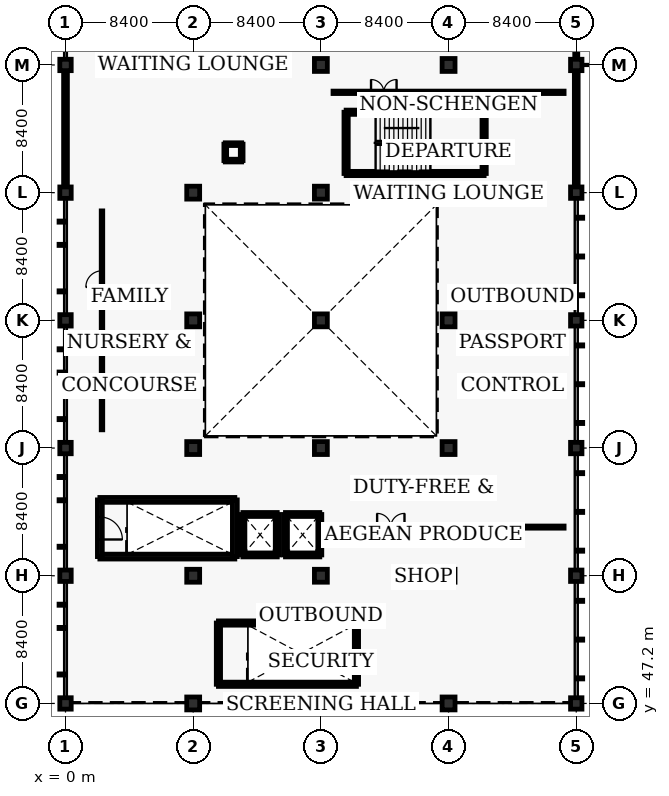
"""IFC4 building model, lengths in metres.
Left out: names, types, materials, properties, quantities, classifications, styles, units other than length and angle.
Written with IfcOpenShell. Run it as: python <this file> out.ifc"""

import sys

from ifc_helpers import new_model, si_unit, direction, frame, frame_2d, origin, origin_2d, place, context, subcontext, project, spatial, rectangle, circle, extrude, element, fill, save


model = new_model("IFC4")
c1 = context("Model", 3, precision=1e-05, world=origin(), true_north=direction((0.0, 1.0)))
c2 = subcontext(c1, "Body", "Model", "MODEL_VIEW")
j1 = project(units=[si_unit("LENGTHUNIT", "METRE"), si_unit("PLANEANGLEUNIT", "RADIAN")], contexts=[c1])
p1 = place(None, origin())
s1 = spatial("IfcSite", under=j1, at=p1, CompositionType="ELEMENT")
p2 = place(p1, origin())
s2 = spatial("IfcBuilding", under=s1, at=p2, CompositionType="ELEMENT")
p3 = place(p2, frame((0.0, 0.0, 5.44)))
s3 = spatial("IfcBuildingStorey", under=s2, at=p3, CompositionType="ELEMENT", Elevation=5.44)
for number, where, z_axis, x_axis in (
    (1, (0.0, 47.2, 0.0), (0.0, 0.0, 1.0), (1.0, 0.0, 0.0)),
    (2, (0.0, 55.6, 0.0), (0.0, 0.0, 1.0), (1.0, 0.0, 0.0)),
    (3, (0.0, 64.0, 0.0), (0.0, 0.0, 1.0), (1.0, 0.0, 0.0)),
    (4, (0.0, 72.4, 0.0), (0.0, 0.0, 1.0), (1.0, 0.0, 0.0)),
    (5, (0.0, 80.8, 0.0), (0.0, 0.0, 1.0), (1.0, 0.0, 0.0)),
    (6, (0.0, 89.2, 0.0), (0.0, 0.0, 1.0), (1.0, 0.0, 0.0)),
):
    element("IfcColumn", number, at=place(p3, frame(where, z_axis=z_axis, x_axis=x_axis)), inside=s3, PredefinedType="COLUMN", context=c2, shape_type="SweptSolid", body=[
        extrude(rectangle(XDim=0.75, YDim=0.75, at=origin_2d()), origin(), (0.0, 0.0, 1.0), 4.16),
    ])
p4 = place(p3, frame((8.4, 47.2, 0.0), z_axis=(0.0, 0.0, 1.0), x_axis=(1.0, 0.0, 0.0)))
e7 = element("IfcColumn", 7, at=p4, inside=s3, PredefinedType="COLUMN", context=c2, shape_type="SweptSolid", body=[
    extrude(circle(Radius=0.425, at=origin_2d()), origin(), (0.0, 0.0, 1.0), 7.582),
])
p5 = place(p3, frame((8.4, 55.6, 0.0), z_axis=(0.0, 0.0, 1.0), x_axis=(1.0, 0.0, 0.0)))
e8 = element("IfcColumn", 8, at=p5, inside=s3, PredefinedType="COLUMN", context=c2, shape_type="SweptSolid", body=[
    extrude(circle(Radius=0.425, at=origin_2d()), origin(), (0.0, 0.0, 1.0), 8.296),
])
p6 = place(p3, frame((8.4, 64.0, 0.0), z_axis=(0.0, 0.0, 1.0), x_axis=(1.0, 0.0, 0.0)))
e9 = element("IfcColumn", 9, at=p6, inside=s3, PredefinedType="COLUMN", context=c2, shape_type="SweptSolid", body=[
    extrude(circle(Radius=0.425, at=origin_2d()), origin(), (0.0, 0.0, 1.0), 9.01),
])
for number, where, z_axis, x_axis in (
    (10, (8.4, 72.4, 0.0), (0.0, 0.0, 1.0), (1.0, 0.0, 0.0)),
    (11, (8.4, 80.8, 0.0), (0.0, 0.0, 1.0), (1.0, 0.0, 0.0)),
    (12, (8.4, 89.2, 0.0), (0.0, 0.0, 1.0), (1.0, 0.0, 0.0)),
):
    element("IfcColumn", number, at=place(p3, frame(where, z_axis=z_axis, x_axis=x_axis)), inside=s3, PredefinedType="COLUMN", context=c2, shape_type="SweptSolid", body=[
        extrude(circle(Radius=0.425, at=origin_2d()), origin(), (0.0, 0.0, 1.0), 4.16),
    ])
p7 = place(p3, frame((16.8, 47.2, 0.0), z_axis=(0.0, 0.0, 1.0), x_axis=(1.0, 0.0, 0.0)))
e13 = element("IfcColumn", 13, at=p7, inside=s3, PredefinedType="COLUMN", context=c2, shape_type="SweptSolid", body=[
    extrude(circle(Radius=0.425, at=origin_2d()), origin(), (0.0, 0.0, 1.0), 10.06),
])
p8 = place(p3, frame((16.8, 55.6, 0.0), z_axis=(0.0, 0.0, 1.0), x_axis=(1.0, 0.0, 0.0)))
e14 = element("IfcColumn", 14, at=p8, inside=s3, PredefinedType="COLUMN", context=c2, shape_type="SweptSolid", body=[
    extrude(circle(Radius=0.425, at=origin_2d()), origin(), (0.0, 0.0, 1.0), 10.774),
])
p9 = place(p3, frame((16.8, 64.0, 0.0), z_axis=(0.0, 0.0, 1.0), x_axis=(1.0, 0.0, 0.0)))
e15 = element("IfcColumn", 15, at=p9, inside=s3, PredefinedType="COLUMN", context=c2, shape_type="SweptSolid", body=[
    extrude(circle(Radius=0.425, at=origin_2d()), origin(), (0.0, 0.0, 1.0), 11.489),
])
for number, where, z_axis, x_axis in (
    (16, (16.8, 72.4, 0.0), (0.0, 0.0, 1.0), (1.0, 0.0, 0.0)),
    (17, (16.8, 80.8, 0.0), (0.0, 0.0, 1.0), (1.0, 0.0, 0.0)),
    (18, (16.8, 89.2, 0.0), (0.0, 0.0, 1.0), (1.0, 0.0, 0.0)),
):
    element("IfcColumn", number, at=place(p3, frame(where, z_axis=z_axis, x_axis=x_axis)), inside=s3, PredefinedType="COLUMN", context=c2, shape_type="SweptSolid", body=[
        extrude(circle(Radius=0.425, at=origin_2d()), origin(), (0.0, 0.0, 1.0), 4.16),
    ])
p10 = place(p3, frame((25.2, 47.2, 0.0), z_axis=(0.0, 0.0, 1.0), x_axis=(1.0, 0.0, 0.0)))
e19 = element("IfcColumn", 19, at=p10, inside=s3, PredefinedType="COLUMN", context=c2, shape_type="SweptSolid", body=[
    extrude(circle(Radius=0.425, at=origin_2d()), origin(), (0.0, 0.0, 1.0), 7.582),
])
p11 = place(p3, frame((25.2, 55.6, 0.0), z_axis=(0.0, 0.0, 1.0), x_axis=(1.0, 0.0, 0.0)))
e20 = element("IfcColumn", 20, at=p11, inside=s3, PredefinedType="COLUMN", context=c2, shape_type="SweptSolid", body=[
    extrude(circle(Radius=0.425, at=origin_2d()), origin(), (0.0, 0.0, 1.0), 8.296),
])
p12 = place(p3, frame((25.2, 64.0, 0.0), z_axis=(0.0, 0.0, 1.0), x_axis=(1.0, 0.0, 0.0)))
e21 = element("IfcColumn", 21, at=p12, inside=s3, PredefinedType="COLUMN", context=c2, shape_type="SweptSolid", body=[
    extrude(circle(Radius=0.425, at=origin_2d()), origin(), (0.0, 0.0, 1.0), 9.01),
])
for number, where, z_axis, x_axis in (
    (22, (25.2, 72.4, 0.0), (0.0, 0.0, 1.0), (1.0, 0.0, 0.0)),
    (23, (25.2, 80.8, 0.0), (0.0, 0.0, 1.0), (1.0, 0.0, 0.0)),
    (24, (25.2, 89.2, 0.0), (0.0, 0.0, 1.0), (1.0, 0.0, 0.0)),
):
    element("IfcColumn", number, at=place(p3, frame(where, z_axis=z_axis, x_axis=x_axis)), inside=s3, PredefinedType="COLUMN", context=c2, shape_type="SweptSolid", body=[
        extrude(circle(Radius=0.425, at=origin_2d()), origin(), (0.0, 0.0, 1.0), 4.16),
    ])
for number, where, z_axis, x_axis in (
    (25, (33.6, 47.2, 0.0), (0.0, 0.0, 1.0), (1.0, 0.0, 0.0)),
    (26, (33.6, 55.6, 0.0), (0.0, 0.0, 1.0), (1.0, 0.0, 0.0)),
    (27, (33.6, 64.0, 0.0), (0.0, 0.0, 1.0), (1.0, 0.0, 0.0)),
    (28, (33.6, 72.4, 0.0), (0.0, 0.0, 1.0), (1.0, 0.0, 0.0)),
    (29, (33.6, 80.8, 0.0), (0.0, 0.0, 1.0), (1.0, 0.0, 0.0)),
    (30, (33.6, 89.2, 0.0), (0.0, 0.0, 1.0), (1.0, 0.0, 0.0)),
):
    element("IfcColumn", number, at=place(p3, frame(where, z_axis=z_axis, x_axis=x_axis)), inside=s3, PredefinedType="COLUMN", context=c2, shape_type="SweptSolid", body=[
        extrude(rectangle(XDim=0.75, YDim=0.75, at=origin_2d()), origin(), (0.0, 0.0, 1.0), 4.16),
    ])
for number, where, z_axis, x_axis in (
    (31, (0.0, 88.825, 0.0), (0.0, 0.0, 1.0), (0.0, -1.0, 0.0)),
    (32, (33.6, 81.175, 0.0), (0.0, 0.0, 1.0), (0.0, 1.0, 0.0)),
):
    element("IfcWall", number, at=place(p3, frame(where, z_axis=z_axis, x_axis=x_axis)), inside=s3, PredefinedType="SOLIDWALL", context=c2, shape_type="SweptSolid", body=[
        extrude(rectangle(XDim=7.65, YDim=0.25, at=frame_2d((3.825, 0.0))), origin(), (0.0, 0.0, 1.0), 3.515),
    ])
for number, where, z_axis, x_axis in (
    (33, (2.26, 56.86, 0.0), (0.0, 0.0, 1.0), (1.0, 0.0, 0.0)),
    (34, (2.26, 60.59, 0.0), (0.0, 0.0, 1.0), (1.0, 0.0, 0.0)),
):
    element("IfcWall", number, at=place(p3, frame(where, z_axis=z_axis, x_axis=x_axis)), inside=s3, PredefinedType="SHEAR", context=c2, shape_type="SweptSolid", body=[
        extrude(rectangle(XDim=8.88, YDim=0.32, at=frame_2d((4.44, 0.0))), origin(), (0.0, 0.0, 1.0), 4.16),
    ])
p13 = place(p3, frame((2.26, 60.59, 0.0), z_axis=(0.0, 0.0, 1.0), x_axis=(0.0, -1.0, 0.0)))
e35 = element("IfcWall", 35, at=p13, inside=s3, PredefinedType="SHEAR", context=c2, shape_type="SweptSolid", body=[
    extrude(rectangle(XDim=3.73, YDim=0.32, at=frame_2d((1.865, 0.0))), origin(), (0.0, 0.0, 1.0), 4.16),
])
p14 = place(p13, frame((1.125, 0.0, 0.0)))
e36 = element("IfcOpeningElement", 36, at=p14, cuts=e35, PredefinedType="OPENING", context=c2, shape_type="SweptSolid", body=[
    extrude(rectangle(XDim=1.48, YDim=2.15, at=frame_2d((0.74, 1.075))), frame((0.0, 0.17, 0.0), z_axis=(0.0, -1.0, 0.0), x_axis=(1.0, 0.0, 0.0)), (0.0, 0.0, 1.0), 0.34),
])
p15 = place(p3, frame((11.14, 56.86, 0.0), z_axis=(0.0, 0.0, 1.0), x_axis=(0.0, 1.0, 0.0)))
e37 = element("IfcWall", 37, at=p15, inside=s3, PredefinedType="SHEAR", context=c2, shape_type="SweptSolid", body=[
    extrude(rectangle(XDim=3.73, YDim=0.32, at=frame_2d((1.865, 0.0))), origin(), (0.0, 0.0, 1.0), 4.16),
])
p16 = place(p3, frame((11.67, 56.97, 0.0), z_axis=(0.0, 0.0, 1.0), x_axis=(1.0, 0.0, 0.0)))
e38 = element("IfcWall", 38, at=p16, inside=s3, PredefinedType="SHEAR", context=c2, shape_type="SweptSolid", body=[
    extrude(rectangle(XDim=2.26, YDim=0.26, at=frame_2d((1.13, 0.0))), origin(), (0.0, 0.0, 1.0), 4.16),
])
for number, where, z_axis, x_axis in (
    (39, (13.93, 56.97, 0.0), (0.0, 0.0, 1.0), (0.0, 1.0, 0.0)),
    (40, (11.67, 59.63, 0.0), (0.0, 0.0, 1.0), (0.0, -1.0, 0.0)),
):
    element("IfcWall", number, at=place(p3, frame(where, z_axis=z_axis, x_axis=x_axis)), inside=s3, PredefinedType="SHEAR", context=c2, shape_type="SweptSolid", body=[
        extrude(rectangle(XDim=2.66, YDim=0.26, at=frame_2d((1.33, 0.0))), origin(), (0.0, 0.0, 1.0), 4.16),
    ])
p17 = place(p3, frame((11.67, 59.63, 0.0), z_axis=(0.0, 0.0, 1.0), x_axis=(1.0, 0.0, 0.0)))
e41 = element("IfcWall", 41, at=p17, inside=s3, PredefinedType="SHEAR", context=c2, shape_type="SweptSolid", body=[
    extrude(rectangle(XDim=2.26, YDim=0.26, at=frame_2d((1.13, 0.0))), origin(), (0.0, 0.0, 1.0), 4.16),
])
p18 = place(p17, frame((0.51, 0.0, 0.0)))
e42 = element("IfcOpeningElement", 42, at=p18, cuts=e41, PredefinedType="OPENING", context=c2, shape_type="SweptSolid", body=[
    extrude(rectangle(XDim=1.24, YDim=2.14, at=frame_2d((0.62, 1.07))), frame((0.0, 0.14, 0.0), z_axis=(0.0, -1.0, 0.0), x_axis=(1.0, 0.0, 0.0)), (0.0, 0.0, 1.0), 0.28),
])
p19 = place(p3, frame((14.47, 56.97, 0.0), z_axis=(0.0, 0.0, 1.0), x_axis=(1.0, 0.0, 0.0)))
e43 = element("IfcWall", 43, at=p19, inside=s3, PredefinedType="SHEAR", context=c2, shape_type="SweptSolid", body=[
    extrude(rectangle(XDim=2.26, YDim=0.26, at=frame_2d((1.13, 0.0))), origin(), (0.0, 0.0, 1.0), 4.16),
])
for number, where, z_axis, x_axis in (
    (44, (16.73, 56.97, 0.0), (0.0, 0.0, 1.0), (0.0, 1.0, 0.0)),
    (45, (14.47, 59.63, 0.0), (0.0, 0.0, 1.0), (0.0, -1.0, 0.0)),
):
    element("IfcWall", number, at=place(p3, frame(where, z_axis=z_axis, x_axis=x_axis)), inside=s3, PredefinedType="SHEAR", context=c2, shape_type="SweptSolid", body=[
        extrude(rectangle(XDim=2.66, YDim=0.26, at=frame_2d((1.33, 0.0))), origin(), (0.0, 0.0, 1.0), 4.16),
    ])
p20 = place(p3, frame((14.47, 59.63, 0.0), z_axis=(0.0, 0.0, 1.0), x_axis=(1.0, 0.0, 0.0)))
e46 = element("IfcWall", 46, at=p20, inside=s3, PredefinedType="SHEAR", context=c2, shape_type="SweptSolid", body=[
    extrude(rectangle(XDim=2.26, YDim=0.26, at=frame_2d((1.13, 0.0))), origin(), (0.0, 0.0, 1.0), 4.16),
])
p21 = place(p20, frame((0.51, 0.0, 0.0)))
e47 = element("IfcOpeningElement", 47, at=p21, cuts=e46, PredefinedType="OPENING", context=c2, shape_type="SweptSolid", body=[
    extrude(rectangle(XDim=1.24, YDim=2.14, at=frame_2d((0.62, 1.07))), frame((0.0, 0.14, 0.0), z_axis=(0.0, -1.0, 0.0), x_axis=(1.0, 0.0, 0.0)), (0.0, 0.0, 1.0), 0.28),
])
for number, where, z_axis, x_axis in (
    (48, (10.06, 48.46, 0.0), (0.0, 0.0, 1.0), (1.0, 0.0, 0.0)),
    (49, (10.06, 52.49, 0.0), (0.0, 0.0, 1.0), (1.0, 0.0, 0.0)),
):
    element("IfcWall", number, at=place(p3, frame(where, z_axis=z_axis, x_axis=x_axis)), inside=s3, PredefinedType="SHEAR", context=c2, shape_type="SweptSolid", body=[
        extrude(rectangle(XDim=9.08, YDim=0.28, at=frame_2d((4.54, 0.0))), origin(), (0.0, 0.0, 1.0), 4.16),
    ])
p22 = place(p3, frame((10.06, 52.49, 0.0), z_axis=(0.0, 0.0, 1.0), x_axis=(0.0, -1.0, 0.0)))
e50 = element("IfcWall", 50, at=p22, inside=s3, PredefinedType="SHEAR", context=c2, shape_type="SweptSolid", body=[
    extrude(rectangle(XDim=4.03, YDim=0.28, at=frame_2d((2.015, 0.0))), origin(), (0.0, 0.0, 1.0), 4.16),
])
p23 = place(p22, frame((1.035, 0.0, 0.0)))
e51 = element("IfcOpeningElement", 51, at=p23, cuts=e50, PredefinedType="OPENING", context=c2, shape_type="SweptSolid", body=[
    extrude(rectangle(XDim=1.96, YDim=2.22, at=frame_2d((0.98, 1.11))), frame((0.0, 0.15, 0.0), z_axis=(0.0, -1.0, 0.0), x_axis=(1.0, 0.0, 0.0)), (0.0, 0.0, 1.0), 0.3),
])
p24 = place(p3, frame((19.14, 48.46, 0.0), z_axis=(0.0, 0.0, 1.0), x_axis=(0.0, 1.0, 0.0)))
e52 = element("IfcWall", 52, at=p24, inside=s3, PredefinedType="SHEAR", context=c2, shape_type="SweptSolid", body=[
    extrude(rectangle(XDim=4.03, YDim=0.28, at=frame_2d((2.015, 0.0))), origin(), (0.0, 0.0, 1.0), 4.16),
])
for number, where, z_axis, x_axis in (
    (53, (18.46, 82.06, 0.0), (0.0, 0.0, 1.0), (1.0, 0.0, 0.0)),
    (54, (18.46, 86.09, 0.0), (0.0, 0.0, 1.0), (1.0, 0.0, 0.0)),
):
    element("IfcWall", number, at=place(p3, frame(where, z_axis=z_axis, x_axis=x_axis)), inside=s3, PredefinedType="SHEAR", context=c2, shape_type="SweptSolid", body=[
        extrude(rectangle(XDim=9.08, YDim=0.28, at=frame_2d((4.54, 0.0))), origin(), (0.0, 0.0, 1.0), 4.16),
    ])
p25 = place(p3, frame((18.46, 86.09, 0.0), z_axis=(0.0, 0.0, 1.0), x_axis=(0.0, -1.0, 0.0)))
e55 = element("IfcWall", 55, at=p25, inside=s3, PredefinedType="SHEAR", context=c2, shape_type="SweptSolid", body=[
    extrude(rectangle(XDim=4.03, YDim=0.28, at=frame_2d((2.015, 0.0))), origin(), (0.0, 0.0, 1.0), 4.16),
])
p26 = place(p25, frame((1.035, 0.0, 0.0)))
e56 = element("IfcOpeningElement", 56, at=p26, cuts=e55, PredefinedType="OPENING", context=c2, shape_type="SweptSolid", body=[
    extrude(rectangle(XDim=1.96, YDim=2.22, at=frame_2d((0.98, 1.11))), frame((0.0, 0.15, 0.0), z_axis=(0.0, -1.0, 0.0), x_axis=(1.0, 0.0, 0.0)), (0.0, 0.0, 1.0), 0.3),
])
p27 = place(p3, frame((27.54, 82.06, 0.0), z_axis=(0.0, 0.0, 1.0), x_axis=(0.0, 1.0, 0.0)))
e57 = element("IfcWall", 57, at=p27, inside=s3, PredefinedType="SHEAR", context=c2, shape_type="SweptSolid", body=[
    extrude(rectangle(XDim=4.03, YDim=0.28, at=frame_2d((2.015, 0.0))), origin(), (0.0, 0.0, 1.0), 4.16),
])
for number, where, z_axis, x_axis in (
    (58, (10.51, 82.91, 0.0), (0.0, 0.0, 1.0), (1.0, 0.0, 0.0)),
    (59, (11.59, 82.91, 0.0), (0.0, 0.0, 1.0), (0.0, 1.0, 0.0)),
    (60, (11.59, 83.99, 0.0), (0.0, 0.0, 1.0), (-1.0, 0.0, 0.0)),
    (61, (10.51, 83.99, 0.0), (0.0, 0.0, 1.0), (0.0, -1.0, 0.0)),
):
    element("IfcWall", number, at=place(p3, frame(where, z_axis=z_axis, x_axis=x_axis)), inside=s3, PredefinedType="SOLIDWALL", context=c2, shape_type="SweptSolid", body=[
        extrude(rectangle(XDim=1.08, YDim=0.18, at=frame_2d((0.54, 0.0))), origin(), (0.0, 0.0, 1.0), 2.6),
    ])
p28 = place(p3, frame((18.0, 58.8, 0.0), z_axis=(0.0, 0.0, 1.0), x_axis=(1.0, 0.0, 0.0)))
e62 = element("IfcWall", 62, at=p28, inside=s3, PredefinedType="PARTITIONING", context=c2, shape_type="SweptSolid", body=[
    extrude(rectangle(XDim=14.8, YDim=0.14, at=frame_2d((7.4, 0.0))), origin(), (0.0, 0.0, 1.0), 2.9),
])
p29 = place(p28, frame((2.5, 0.0, 0.0)))
e63 = element("IfcOpeningElement", 63, at=p29, cuts=e62, PredefinedType="OPENING", context=c2, shape_type="SweptSolid", body=[
    extrude(rectangle(XDim=1.8, YDim=2.18, at=frame_2d((0.9, 1.09))), frame((0.0, 0.08, 0.0), z_axis=(0.0, -1.0, 0.0), x_axis=(1.0, 0.0, 0.0)), (0.0, 0.0, 1.0), 0.16),
])
p30 = place(p3, frame((17.6, 87.4, 0.0), z_axis=(0.0, 0.0, 1.0), x_axis=(1.0, 0.0, 0.0)))
e64 = element("IfcWall", 64, at=p30, inside=s3, PredefinedType="PARTITIONING", context=c2, shape_type="SweptSolid", body=[
    extrude(rectangle(XDim=15.2, YDim=0.16, at=frame_2d((7.6, 0.0))), origin(), (0.0, 0.0, 1.0), 2.9),
])
p31 = place(p30, frame((2.5, 0.0, 0.0)))
e65 = element("IfcOpeningElement", 65, at=p31, cuts=e64, PredefinedType="OPENING", context=c2, shape_type="SweptSolid", body=[
    extrude(rectangle(XDim=1.68, YDim=2.18, at=frame_2d((0.84, 1.09))), frame((0.0, 0.09, 0.0), z_axis=(0.0, -1.0, 0.0), x_axis=(1.0, 0.0, 0.0)), (0.0, 0.0, 1.0), 0.18),
])
p32 = place(p3, frame((2.4, 65.2, 0.0), z_axis=(0.0, 0.0, 1.0), x_axis=(0.0, 1.0, 0.0)))
e66 = element("IfcWall", 66, at=p32, inside=s3, PredefinedType="PARTITIONING", context=c2, shape_type="SweptSolid", body=[
    extrude(rectangle(XDim=14.4, YDim=0.1, at=frame_2d((7.2, 0.0))), origin(), (0.0, 0.0, 1.0), 2.9),
])
p33 = place(p32, frame((2.1, 0.0, 0.0)))
e67 = element("IfcOpeningElement", 67, at=p33, cuts=e66, PredefinedType="OPENING", context=c2, shape_type="SweptSolid", body=[
    extrude(rectangle(XDim=0.9, YDim=2.06, at=frame_2d((0.45, 1.03))), frame((0.0, 0.06, 0.0), z_axis=(0.0, -1.0, 0.0), x_axis=(1.0, 0.0, 0.0)), (0.0, 0.0, 1.0), 0.12),
])
p34 = place(p32, frame((9.4, 0.0, 0.0)))
e68 = element("IfcOpeningElement", 68, at=p34, cuts=e66, PredefinedType="OPENING", context=c2, shape_type="SweptSolid", body=[
    extrude(rectangle(XDim=1.06, YDim=2.1, at=frame_2d((0.53, 1.05))), frame((0.0, 0.06, 0.0), z_axis=(0.0, -1.0, 0.0), x_axis=(1.0, 0.0, 0.0)), (0.0, 0.0, 1.0), 0.12),
])
p35 = place(p3, frame((33.6, 89.65, 0.0), z_axis=(0.0, 0.0, 1.0), x_axis=(0.0, 1.0, 0.0)))
e69 = element("IfcWall", 69, at=p35, inside=s3, PredefinedType="SOLIDWALL", context=c2, shape_type="SweptSolid", body=[
    extrude(rectangle(XDim=7.5, YDim=0.2, at=frame_2d((3.75, 0.0))), origin(), (0.0, 0.0, 1.0), 3.515),
])
p36 = place(p35, frame((2.5, 0.0, 0.0)))
e70 = element("IfcOpeningElement", 70, at=p36, cuts=e69, PredefinedType="OPENING", context=c2, shape_type="SweptSolid", body=[
    extrude(rectangle(XDim=2.1, YDim=2.22, at=frame_2d((1.05, 1.11))), frame((0.0, 0.11, 0.0), z_axis=(0.0, -1.0, 0.0), x_axis=(1.0, 0.0, 0.0)), (0.0, 0.0, 1.0), 0.22),
])
p37 = place(p14, origin())
e71 = element("IfcDoor", 71, at=p37, inside=s3, OperationType="SINGLE_SWING_RIGHT", PredefinedType="DOOR", context=c2, shape_type="SweptSolid", body=[
    extrude(rectangle(XDim=1.48, YDim=2.15, at=frame_2d((0.74, 1.075))), frame((0.0, 0.025, 0.0), z_axis=(0.0, -1.0, 0.0), x_axis=(1.0, 0.0, 0.0)), (0.0, 0.0, 1.0), 0.05),
])
fill(e36, e71)
p38 = place(p18, origin())
e72 = element("IfcDoor", 72, at=p38, inside=s3, OperationType="DOUBLE_DOOR_SLIDING", PredefinedType="DOOR", context=c2, shape_type="SweptSolid", body=[
    extrude(rectangle(XDim=1.24, YDim=2.14, at=frame_2d((0.62, 1.07))), frame((0.0, 0.025, 0.0), z_axis=(0.0, -1.0, 0.0), x_axis=(1.0, 0.0, 0.0)), (0.0, 0.0, 1.0), 0.05),
])
fill(e42, e72)
p39 = place(p21, origin())
e73 = element("IfcDoor", 73, at=p39, inside=s3, OperationType="DOUBLE_DOOR_SLIDING", PredefinedType="DOOR", context=c2, shape_type="SweptSolid", body=[
    extrude(rectangle(XDim=1.24, YDim=2.14, at=frame_2d((0.62, 1.07))), frame((0.0, 0.025, 0.0), z_axis=(0.0, -1.0, 0.0), x_axis=(1.0, 0.0, 0.0)), (0.0, 0.0, 1.0), 0.05),
])
fill(e47, e73)
p40 = place(p23, origin())
e74 = element("IfcDoor", 74, at=p40, inside=s3, OperationType="DOUBLE_DOOR_SLIDING", PredefinedType="DOOR", context=c2, shape_type="SweptSolid", body=[
    extrude(rectangle(XDim=1.96, YDim=2.22, at=frame_2d((0.98, 1.11))), frame((0.0, 0.025, 0.0), z_axis=(0.0, -1.0, 0.0), x_axis=(1.0, 0.0, 0.0)), (0.0, 0.0, 1.0), 0.05),
])
fill(e51, e74)
p41 = place(p26, origin())
e75 = element("IfcDoor", 75, at=p41, inside=s3, OperationType="DOUBLE_DOOR_SLIDING", PredefinedType="DOOR", context=c2, shape_type="SweptSolid", body=[
    extrude(rectangle(XDim=1.96, YDim=2.22, at=frame_2d((0.98, 1.11))), frame((0.0, 0.025, 0.0), z_axis=(0.0, -1.0, 0.0), x_axis=(1.0, 0.0, 0.0)), (0.0, 0.0, 1.0), 0.05),
])
fill(e56, e75)
p42 = place(p29, origin())
e76 = element("IfcDoor", 76, at=p42, inside=s3, OperationType="DOUBLE_DOOR_SINGLE_SWING", PredefinedType="DOOR", context=c2, shape_type="SweptSolid", body=[
    extrude(rectangle(XDim=1.8, YDim=2.18, at=frame_2d((0.9, 1.09))), frame((0.0, 0.025, 0.0), z_axis=(0.0, -1.0, 0.0), x_axis=(1.0, 0.0, 0.0)), (0.0, 0.0, 1.0), 0.05),
])
fill(e63, e76)
p43 = place(p31, origin())
e77 = element("IfcDoor", 77, at=p43, inside=s3, OperationType="DOUBLE_DOOR_SINGLE_SWING", PredefinedType="DOOR", context=c2, shape_type="SweptSolid", body=[
    extrude(rectangle(XDim=1.68, YDim=2.18, at=frame_2d((0.84, 1.09))), frame((0.0, 0.025, 0.0), z_axis=(0.0, -1.0, 0.0), x_axis=(1.0, 0.0, 0.0)), (0.0, 0.0, 1.0), 0.05),
])
fill(e65, e77)
p44 = place(p33, origin())
e78 = element("IfcDoor", 78, at=p44, inside=s3, OperationType="SINGLE_SWING_RIGHT", PredefinedType="DOOR", context=c2, shape_type="SweptSolid", body=[
    extrude(rectangle(XDim=0.9, YDim=2.06, at=frame_2d((0.45, 1.03))), frame((0.0, 0.025, 0.0), z_axis=(0.0, -1.0, 0.0), x_axis=(1.0, 0.0, 0.0)), (0.0, 0.0, 1.0), 0.05),
])
fill(e67, e78)
p45 = place(p34, origin())
e79 = element("IfcDoor", 79, at=p45, inside=s3, OperationType="SINGLE_SWING_LEFT", PredefinedType="DOOR", context=c2, shape_type="SweptSolid", body=[
    extrude(rectangle(XDim=1.06, YDim=2.1, at=frame_2d((0.53, 1.05))), frame((0.0, 0.025, 0.0), z_axis=(0.0, -1.0, 0.0), x_axis=(1.0, 0.0, 0.0)), (0.0, 0.0, 1.0), 0.05),
])
fill(e68, e79)
save(model, sys.argv[1])
